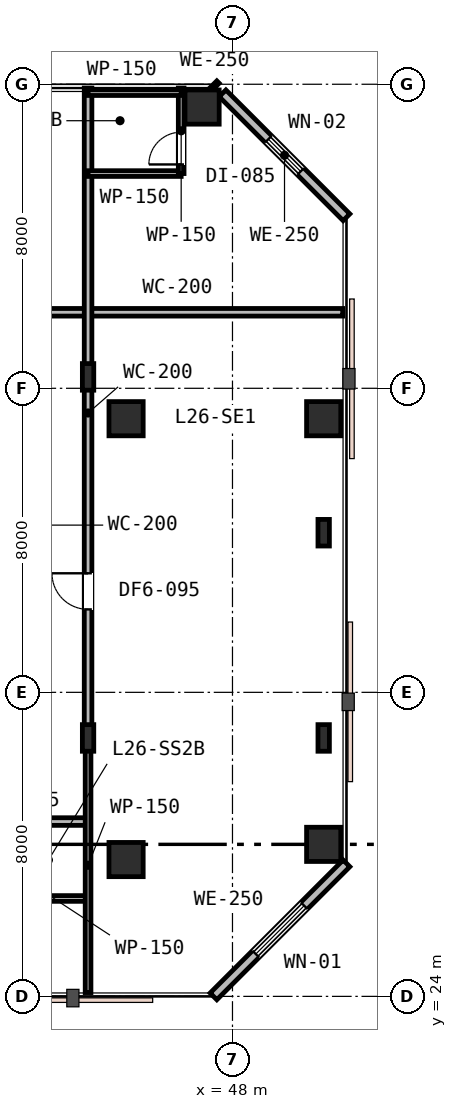
"""IFC4 building model, lengths in metres.
Left out: names, types, materials, properties, quantities, classifications, styles, units other than length and angle.
Written with IfcOpenShell. Run it as: python <this file> out.ifc"""

import sys

from ifc_helpers import new_model, si_unit, direction, frame, frame_2d, origin, origin_2d, place, context, subcontext, project, spatial, rectangle, i_section, extrude, element, fill, save


model = new_model("IFC4")
c1 = context("Model", 3, precision=1e-05, world=origin(), true_north=direction((0.0, 1.0)))
c2 = subcontext(c1, "Body", "Model", "MODEL_VIEW")
j1 = project(units=[si_unit("LENGTHUNIT", "METRE"), si_unit("PLANEANGLEUNIT", "RADIAN")], contexts=[c1])
p1 = place(None, origin())
s1 = spatial("IfcSite", under=j1, at=p1, CompositionType="ELEMENT")
p2 = place(p1, origin())
s2 = spatial("IfcBuilding", under=s1, at=p2, CompositionType="ELEMENT")
p3 = place(p2, frame((0.0, 0.0, 104.4)))
s3 = spatial("IfcBuildingStorey", under=s2, at=p3, CompositionType="ELEMENT", Elevation=104.4)
for number, where, z_axis, x_axis in (
    (1, (45.2, 27.6, 0.0), (0.0, 0.0, 1.0), (1.0, 0.0, 0.0)),
    (2, (45.2, 39.2, 0.0), (0.0, 0.0, 1.0), (1.0, 0.0, 0.0)),
    (3, (47.2, 47.4, 0.0), (0.0, 0.0, 1.0), (1.0, 0.0, 0.0)),
    (4, (50.4, 28.0, 0.0), (0.0, 0.0, 1.0), (1.0, 0.0, 0.0)),
    (5, (50.4, 39.2, 0.0), (0.0, 0.0, 1.0), (1.0, 0.0, 0.0)),
):
    element("IfcColumn", number, at=place(p3, frame(where, z_axis=z_axis, x_axis=x_axis)), inside=s3, PredefinedType="COLUMN", context=c2, shape_type="SweptSolid", body=[
        extrude(rectangle(XDim=0.9, YDim=0.9, at=origin_2d()), origin(), (0.0, 0.0, 1.0), 3.6),
    ])
for number, where, z_axis, x_axis in (
    (6, (44.2, 30.8, 0.0), (0.0, 0.0, 1.0), (1.0, 0.0, 0.0)),
    (7, (44.2, 40.3, 0.0), (0.0, 0.0, 1.0), (1.0, 0.0, 0.0)),
    (8, (50.4, 30.8, 0.0), (0.0, 0.0, 1.0), (1.0, 0.0, 0.0)),
    (9, (50.4, 36.2, 0.0), (0.0, 0.0, 1.0), (1.0, 0.0, 0.0)),
):
    element("IfcColumn", number, at=place(p3, frame(where, z_axis=z_axis, x_axis=x_axis)), inside=s3, PredefinedType="COLUMN", context=c2, shape_type="SweptSolid", body=[
        extrude(i_section(OverallWidth=0.3, OverallDepth=0.7, WebThickness=0.017, FlangeThickness=0.032, FilletRadius=0.027, at=origin_2d()), origin(), (0.0, 0.0, 1.0), 3.6),
    ])
p4 = place(p3, frame((47.5, 24.0, 0.0), z_axis=(0.0, 0.0, 1.0), x_axis=(0.707106781187, 0.707106781187, 0.0)))
e10 = element("IfcWall", 10, at=p4, inside=s3, PredefinedType="STANDARD", context=c2, shape_type="SweptSolid", body=[
    extrude(rectangle(XDim=4.95, YDim=0.25, at=frame_2d((2.475, 0.0))), origin(), (0.0, 0.0, 1.0), 3.33),
])
p5 = place(p4, frame((1.575, 0.0, 0.75)))
e11 = element("IfcOpeningElement", 11, at=p5, cuts=e10, PredefinedType="OPENING", context=c2, shape_type="SweptSolid", body=[
    extrude(rectangle(XDim=1.8, YDim=1.85, at=frame_2d((0.9, 0.925))), frame((0.0, 0.135, 0.0), z_axis=(0.0, -1.0, 0.0), x_axis=(1.0, 0.0, 0.0)), (0.0, 0.0, 1.0), 0.27),
])
p6 = place(p3, frame((51.0, 44.5, 0.0), z_axis=(0.0, 0.0, 1.0), x_axis=(-0.707106781187, 0.707106781187, 0.0)))
e12 = element("IfcWall", 12, at=p6, inside=s3, PredefinedType="STANDARD", context=c2, shape_type="SweptSolid", body=[
    extrude(rectangle(XDim=4.613, YDim=0.25, at=frame_2d((2.306, 0.0))), origin(), (0.0, 0.0, 1.0), 3.33),
])
p7 = place(p6, frame((1.706, 0.0, 0.85)))
e13 = element("IfcOpeningElement", 13, at=p7, cuts=e12, PredefinedType="OPENING", context=c2, shape_type="SweptSolid", body=[
    extrude(rectangle(XDim=1.2, YDim=1.6, at=frame_2d((0.6, 0.8))), frame((0.0, 0.135, 0.0), z_axis=(0.0, -1.0, 0.0), x_axis=(1.0, 0.0, 0.0)), (0.0, 0.0, 1.0), 0.27),
])
p8 = place(p3, frame((47.562, 47.938, 0.0), z_axis=(0.0, 0.0, 1.0), x_axis=(-0.707106781187, 0.707106781187, 0.0)))
e14 = element("IfcWall", 14, at=p8, inside=s3, PredefinedType="STANDARD", context=c2, shape_type="SweptSolid", body=[
    extrude(rectangle(XDim=0.087, YDim=0.25, at=frame_2d((0.044, 0.0))), origin(), (0.0, 0.0, 1.0), 3.33),
])
p9 = place(p3, frame((15.4, 28.6, 0.0), z_axis=(0.0, 0.0, 1.0), x_axis=(1.0, 0.0, 0.0)))
e15 = element("IfcWall", 15, at=p9, inside=s3, PredefinedType="PARTITIONING", context=c2, shape_type="SweptSolid", body=[
    extrude(rectangle(XDim=28.8, YDim=0.2, at=frame_2d((14.4, 0.0))), origin(), (0.0, 0.0, 1.0), 2.87),
])
p10 = place(p9, frame((12.41, 0.0, 0.0)))
e16 = element("IfcOpeningElement", 16, at=p10, cuts=e15, PredefinedType="OPENING", context=c2, shape_type="SweptSolid", body=[
    extrude(rectangle(XDim=0.95, YDim=2.15, at=frame_2d((0.475, 1.075))), frame((0.0, 0.11, 0.0), z_axis=(0.0, -1.0, 0.0), x_axis=(1.0, 0.0, 0.0)), (0.0, 0.0, 1.0), 0.22),
])
p11 = place(p9, frame((22.68, 0.0, 0.0)))
e17 = element("IfcOpeningElement", 17, at=p11, cuts=e15, PredefinedType="OPENING", context=c2, shape_type="SweptSolid", body=[
    extrude(rectangle(XDim=0.95, YDim=2.15, at=frame_2d((0.475, 1.075))), frame((0.0, 0.11, 0.0), z_axis=(0.0, -1.0, 0.0), x_axis=(1.0, 0.0, 0.0)), (0.0, 0.0, 1.0), 0.22),
])
p12 = place(p3, frame((42.2, 42.0, 0.0), z_axis=(0.0, 0.0, 1.0), x_axis=(1.0, 0.0, 0.0)))
e18 = element("IfcWall", 18, at=p12, inside=s3, PredefinedType="PARTITIONING", context=c2, shape_type="SweptSolid", body=[
    extrude(rectangle(XDim=8.7, YDim=0.2, at=frame_2d((4.35, 0.0))), origin(), (0.0, 0.0, 1.0), 3.33),
])
p13 = place(p3, frame((41.75, 26.576, 0.0), z_axis=(0.0, 0.0, 1.0), x_axis=(1.0, 0.0, 0.0)))
e19 = element("IfcWall", 19, at=p13, inside=s3, PredefinedType="PARTITIONING", context=c2, shape_type="SweptSolid", body=[
    extrude(rectangle(XDim=2.45, YDim=0.15, at=frame_2d((1.225, 0.0))), origin(), (0.0, 0.0, 1.0), 3.33),
])
p14 = place(p3, frame((44.2, 30.8, 0.0), z_axis=(0.0, 0.0, 1.0), x_axis=(0.0, -1.0, 0.0)))
e20 = element("IfcWall", 20, at=p14, inside=s3, PredefinedType="PARTITIONING", context=c2, shape_type="SweptSolid", body=[
    extrude(rectangle(XDim=6.7, YDim=0.15, at=frame_2d((3.35, 0.0))), origin(), (0.0, 0.0, 1.0), 2.87),
])
p15 = place(p3, frame((44.2, 30.8, 0.0), z_axis=(0.0, 0.0, 1.0), x_axis=(0.0, 1.0, 0.0)))
e21 = element("IfcWall", 21, at=p15, inside=s3, PredefinedType="PARTITIONING", context=c2, shape_type="SweptSolid", body=[
    extrude(rectangle(XDim=17.1, YDim=0.2, at=frame_2d((8.55, 0.0))), origin(), (0.0, 0.0, 1.0), 2.87),
])
p16 = place(p15, frame((3.382, 0.0, 0.0)))
e22 = element("IfcOpeningElement", 22, at=p16, cuts=e21, PredefinedType="OPENING", context=c2, shape_type="SweptSolid", body=[
    extrude(rectangle(XDim=0.95, YDim=2.15, at=frame_2d((0.475, 1.075))), frame((0.0, 0.11, 0.0), z_axis=(0.0, -1.0, 0.0), x_axis=(1.0, 0.0, 0.0)), (0.0, 0.0, 1.0), 0.22),
])
p17 = place(p3, frame((44.2, 45.65, 0.0), z_axis=(0.0, 0.0, 1.0), x_axis=(1.0, 0.0, 0.0)))
e23 = element("IfcWall", 23, at=p17, inside=s3, PredefinedType="PARTITIONING", context=c2, shape_type="SweptSolid", body=[
    extrude(rectangle(XDim=2.45, YDim=0.15, at=frame_2d((1.225, 0.0))), origin(), (0.0, 0.0, 1.0), 3.33),
])
p18 = place(p3, frame((46.65, 45.65, 0.0), z_axis=(0.0, 0.0, 1.0), x_axis=(0.0, 1.0, 0.0)))
e24 = element("IfcWall", 24, at=p18, inside=s3, PredefinedType="PARTITIONING", context=c2, shape_type="SweptSolid", body=[
    extrude(rectangle(XDim=2.25, YDim=0.15, at=frame_2d((1.125, 0.0))), origin(), (0.0, 0.0, 1.0), 2.96),
])
p19 = place(p18, frame((0.24, 0.0, 0.0)))
e25 = element("IfcOpeningElement", 25, at=p19, cuts=e24, PredefinedType="OPENING", context=c2, shape_type="SweptSolid", body=[
    extrude(rectangle(XDim=0.85, YDim=2.15, at=frame_2d((0.425, 1.075))), frame((0.0, 0.085, 0.0), z_axis=(0.0, -1.0, 0.0), x_axis=(1.0, 0.0, 0.0)), (0.0, 0.0, 1.0), 0.17),
])
p20 = place(p3, frame((44.2, 47.78, 0.0), z_axis=(0.0, 0.0, 1.0), x_axis=(1.0, 0.0, 0.0)))
e26 = element("IfcWall", 26, at=p20, inside=s3, PredefinedType="PARTITIONING", context=c2, shape_type="SweptSolid", body=[
    extrude(rectangle(XDim=2.45, YDim=0.15, at=frame_2d((1.225, 0.0))), origin(), (0.0, 0.0, 1.0), 2.96),
])
p21 = place(p5, origin())
e27 = element("IfcWindow", 27, at=p21, inside=s3, PartitioningType="SINGLE_PANEL", PredefinedType="WINDOW", context=c2, shape_type="SweptSolid", body=[
    extrude(rectangle(XDim=1.8, YDim=1.85, at=frame_2d((0.9, 0.925))), frame((0.0, 0.03, 0.0), z_axis=(0.0, -1.0, 0.0), x_axis=(1.0, 0.0, 0.0)), (0.0, 0.0, 1.0), 0.06),
])
fill(e11, e27)
p22 = place(p7, origin())
e28 = element("IfcWindow", 28, at=p22, inside=s3, PartitioningType="SINGLE_PANEL", PredefinedType="WINDOW", context=c2, shape_type="SweptSolid", body=[
    extrude(rectangle(XDim=1.2, YDim=1.6, at=frame_2d((0.6, 0.8))), frame((0.0, 0.03, 0.0), z_axis=(0.0, -1.0, 0.0), x_axis=(1.0, 0.0, 0.0)), (0.0, 0.0, 1.0), 0.06),
])
fill(e13, e28)
p23 = place(p16, origin())
e29 = element("IfcDoor", 29, at=p23, inside=s3, OperationType="SINGLE_SWING_RIGHT", PredefinedType="DOOR", context=c2, shape_type="SweptSolid", body=[
    extrude(rectangle(XDim=0.95, YDim=2.15, at=frame_2d((0.475, 1.075))), frame((0.0, 0.025, 0.0), z_axis=(0.0, -1.0, 0.0), x_axis=(1.0, 0.0, 0.0)), (0.0, 0.0, 1.0), 0.05),
])
fill(e22, e29)
p24 = place(p19, origin())
e30 = element("IfcDoor", 30, at=p24, inside=s3, OperationType="SINGLE_SWING_LEFT", PredefinedType="DOOR", context=c2, shape_type="SweptSolid", body=[
    extrude(rectangle(XDim=0.85, YDim=2.15, at=frame_2d((0.425, 1.075))), frame((0.0, 0.025, 0.0), z_axis=(0.0, -1.0, 0.0), x_axis=(1.0, 0.0, 0.0)), (0.0, 0.0, 1.0), 0.05),
])
fill(e25, e30)
save(model, sys.argv[1])
